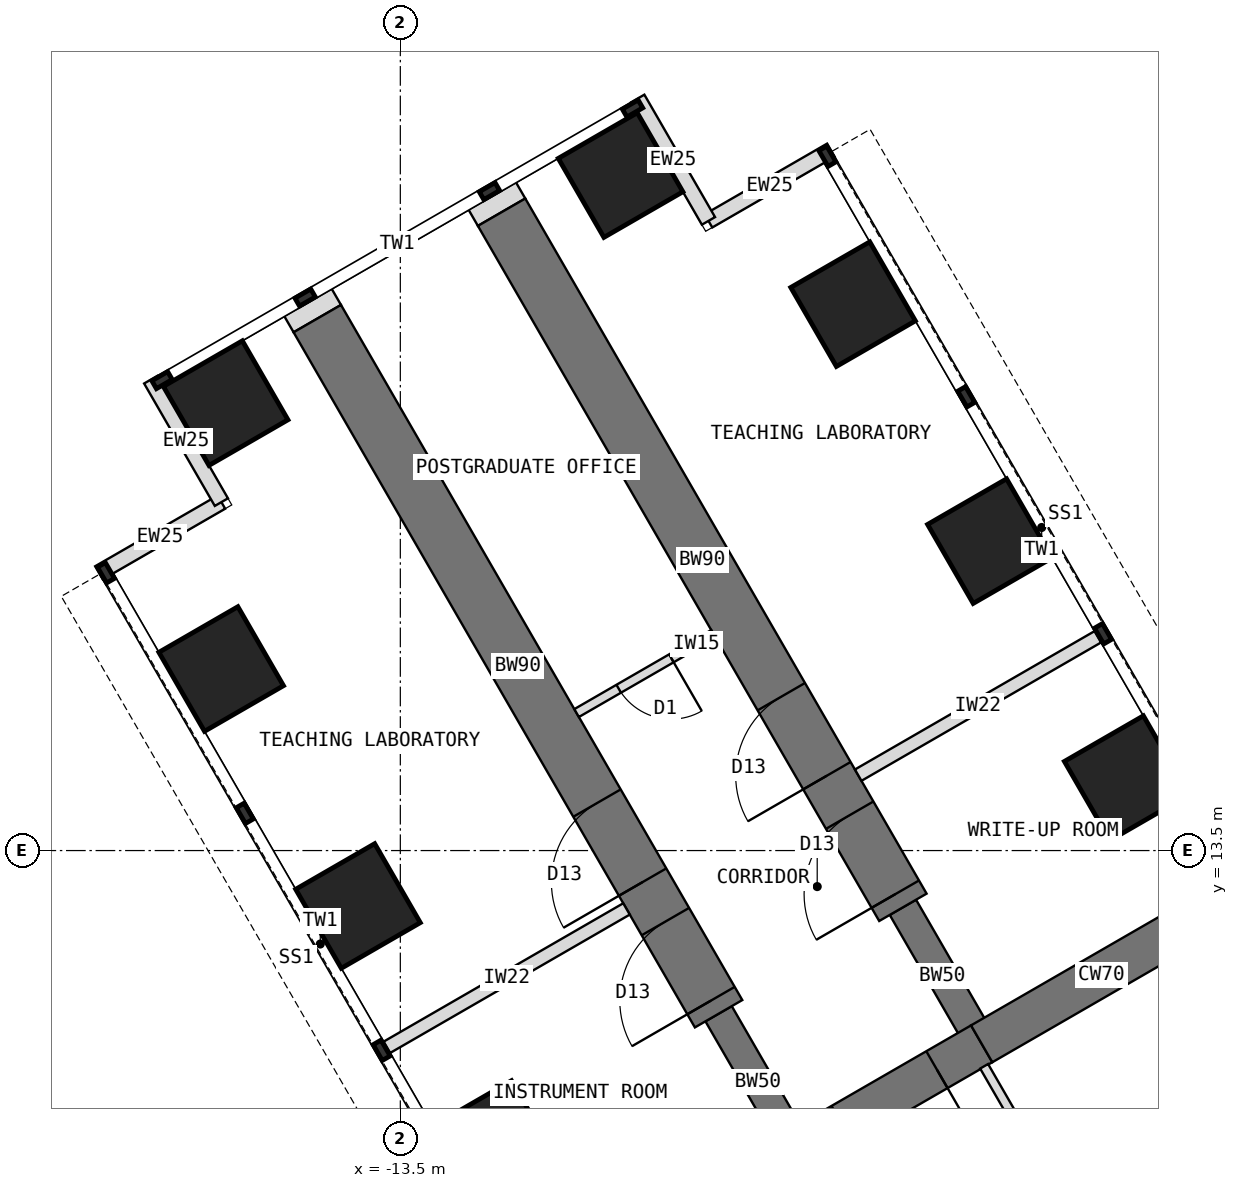
"""IFC4 building model, lengths in metres.
Left out: names, types, materials, properties, quantities, classifications, styles, units other than length and angle.
Written with IfcOpenShell. Run it as: python <this file> out.ifc"""

import sys

from ifc_helpers import new_model, si_unit, direction, frame, frame_2d, origin, origin_2d, place, context, subcontext, project, spatial, rectangle, extrude, element, fill, save


model = new_model("IFC4")
c1 = context("Model", 3, precision=1e-05, world=origin(), true_north=direction((0.0, 1.0)))
c2 = subcontext(c1, "Body", "Model", "MODEL_VIEW")
j1 = project(units=[si_unit("LENGTHUNIT", "METRE"), si_unit("PLANEANGLEUNIT", "RADIAN")], contexts=[c1])
p1 = place(None, origin())
s1 = spatial("IfcSite", under=j1, at=p1, CompositionType="ELEMENT")
p2 = place(p1, origin())
s2 = spatial("IfcBuilding", under=s1, at=p2, CompositionType="ELEMENT")
p3 = place(p2, frame((0.0, 0.0, 24.5)))
s3 = spatial("IfcBuildingStorey", under=s2, at=p3, CompositionType="ELEMENT", Elevation=24.5)
p4 = place(p3, frame((0.0, 12.596, 0.0), z_axis=(0.0, 0.0, 1.0), x_axis=(-0.866011268655, -0.500024481964, 0.0)))
e1 = element("IfcWall", 1, at=p4, inside=s3, PredefinedType="SHEAR", context=c2, shape_type="SweptSolid", body=[
    extrude(rectangle(XDim=4.548, YDim=0.7, at=frame_2d((2.274, 0.0))), origin(), (0.0, 0.0, 1.0), 4.0),
])
p5 = place(p3, frame((-3.939, 10.322, 0.0), z_axis=(0.0, 0.0, 1.0), x_axis=(-0.866019471182, -0.500010275428, 0.0)))
e2 = element("IfcWall", 2, at=p5, inside=s3, PredefinedType="SHEAR", context=c2, shape_type="SweptSolid", body=[
    extrude(rectangle(XDim=3.5, YDim=0.7, at=frame_2d((1.75, 0.0))), origin(), (0.0, 0.0, 1.0), 4.0),
])
p6 = place(p5, frame((0.85, 0.0, 0.0)))
e3 = element("IfcOpeningElement", 3, at=p6, cuts=e2, PredefinedType="OPENING", context=c2, shape_type="SweptSolid", body=[
    extrude(rectangle(XDim=1.8, YDim=2.1, at=frame_2d((0.9, 1.05))), frame((0.0, 0.36, 0.0), z_axis=(0.0, -1.0, 0.0), x_axis=(1.0, 0.0, 0.0)), (0.0, 0.0, 1.0), 0.72),
])
p7 = place(p3, frame((-6.97, 8.572, 0.0), z_axis=(0.0, 0.0, 1.0), x_axis=(-0.499988811324, 0.866031863473, 0.0)))
e4 = element("IfcWall", 4, at=p7, inside=s3, PredefinedType="SHEAR", context=c2, shape_type="SweptSolid", body=[
    extrude(rectangle(XDim=2.592, YDim=0.5, at=frame_2d((1.296, 0.0))), origin(), (0.0, 0.0, 1.0), 4.0),
])
p8 = place(p3, frame((-8.266, 10.816, 0.0), z_axis=(0.0, 0.0, 1.0), x_axis=(-0.499996231654, 0.866027579429, 0.0)))
e5 = element("IfcWall", 5, at=p8, inside=s3, PredefinedType="SHEAR", context=c2, shape_type="SweptSolid", body=[
    extrude(rectangle(XDim=13.2, YDim=0.9, at=frame_2d((6.6, 0.0))), origin(), (0.0, 0.0, 1.0), 4.0),
])
p9 = place(p8, frame((0.25, 0.0, 0.0)))
e6 = element("IfcOpeningElement", 6, at=p9, cuts=e5, PredefinedType="OPENING", context=c2, shape_type="SweptSolid", body=[
    extrude(rectangle(XDim=1.5, YDim=2.1, at=frame_2d((0.75, 1.05))), frame((0.0, 0.46, 0.0), z_axis=(0.0, -1.0, 0.0), x_axis=(1.0, 0.0, 0.0)), (0.0, 0.0, 1.0), 0.92),
])
p10 = place(p8, frame((2.5, 0.0, 0.0)))
e7 = element("IfcOpeningElement", 7, at=p10, cuts=e5, PredefinedType="OPENING", context=c2, shape_type="SweptSolid", body=[
    extrude(rectangle(XDim=1.5, YDim=2.1, at=frame_2d((0.75, 1.05))), frame((0.0, 0.46, 0.0), z_axis=(0.0, -1.0, 0.0), x_axis=(1.0, 0.0, 0.0)), (0.0, 0.0, 1.0), 0.92),
])
p11 = place(p3, frame((-3.939, 10.322, 0.0), z_axis=(0.0, 0.0, 1.0), x_axis=(-0.499918158782, 0.866072649678, 0.0)))
e8 = element("IfcWall", 8, at=p11, inside=s3, PredefinedType="SHEAR", context=c2, shape_type="SweptSolid", body=[
    extrude(rectangle(XDim=2.592, YDim=0.5, at=frame_2d((1.296, 0.0))), origin(), (0.0, 0.0, 1.0), 4.0),
])
p12 = place(p3, frame((-5.234, 12.566, 0.0), z_axis=(0.0, 0.0, 1.0), x_axis=(-0.500010103361, 0.866019570528, 0.0)))
e9 = element("IfcWall", 9, at=p12, inside=s3, PredefinedType="SHEAR", context=c2, shape_type="SweptSolid", body=[
    extrude(rectangle(XDim=13.2, YDim=0.9, at=frame_2d((6.6, 0.0))), origin(), (0.0, 0.0, 1.0), 4.0),
])
p13 = place(p12, frame((0.25, 0.0, 0.0)))
e10 = element("IfcOpeningElement", 10, at=p13, cuts=e9, PredefinedType="OPENING", context=c2, shape_type="SweptSolid", body=[
    extrude(rectangle(XDim=1.5, YDim=2.1, at=frame_2d((0.75, 1.05))), frame((0.0, 0.46, 0.0), z_axis=(0.0, -1.0, 0.0), x_axis=(1.0, 0.0, 0.0)), (0.0, 0.0, 1.0), 0.92),
])
p14 = place(p12, frame((2.5, 0.0, 0.0)))
e11 = element("IfcOpeningElement", 11, at=p14, cuts=e9, PredefinedType="OPENING", context=c2, shape_type="SweptSolid", body=[
    extrude(rectangle(XDim=1.5, YDim=2.1, at=frame_2d((0.75, 1.05))), frame((0.0, 0.46, 0.0), z_axis=(0.0, -1.0, 0.0), x_axis=(1.0, 0.0, 0.0)), (0.0, 0.0, 1.0), 0.92),
])
for number, where, z_axis, x_axis in (
    (12, (-11.946, 8.691, 0.0), (0.0, 0.0, 1.0), (0.866, 0.5, 0.0)),
    (13, (-1.554, 14.691, 0.0), (0.0, 0.0, 1.0), (0.866, 0.5, 0.0)),
    (14, (-14.196, 12.588, 0.0), (0.0, 0.0, 1.0), (0.866, 0.5, 0.0)),
    (15, (-3.804, 18.588, 0.0), (0.0, 0.0, 1.0), (0.866, 0.5, 0.0)),
    (16, (-16.446, 16.486, 0.0), (0.0, 0.0, 1.0), (0.866, 0.5, 0.0)),
    (17, (-6.054, 22.486, 0.0), (0.0, 0.0, 1.0), (0.866, 0.5, 0.0)),
    (18, (-16.373, 20.858, 0.0), (0.0, 0.0, 1.0), (0.866, 0.5, 0.0)),
    (19, (-9.877, 24.608, 0.0), (0.0, 0.0, 1.0), (0.866, 0.5, 0.0)),
):
    element("IfcColumn", number, at=place(p3, frame(where, z_axis=z_axis, x_axis=x_axis)), inside=s3, PredefinedType="COLUMN", context=c2, shape_type="SweptSolid", body=[
        extrude(rectangle(XDim=1.5, YDim=1.5, at=origin_2d()), origin(), (0.0, 0.0, 1.0), 4.0),
    ])
for number, where, z_axis, x_axis in (
    (20, (-18.456, 18.067, 0.0), (0.0, 0.0, 1.0), (0.866, 0.5, 0.0)),
    (21, (-16.443, 19.23, 0.0), (0.0, 0.0, 1.0), (-0.5, 0.866, 0.0)),
    (22, (-6.419, 25.017, 0.0), (0.0, 0.0, 1.0), (-0.866, -0.5, 0.0)),
    (23, (-8.432, 23.855, 0.0), (0.0, 0.0, 1.0), (-0.5, 0.866, 0.0)),
):
    element("IfcWall", number, at=place(p3, frame(where, z_axis=z_axis, x_axis=x_axis)), inside=s3, PredefinedType="STANDARD", context=c2, shape_type="SweptSolid", body=[
        extrude(rectangle(XDim=2.325, YDim=0.25, at=frame_2d((1.163, 0.0))), origin(), (0.0, 0.0, 1.0), 3.8),
    ])
for number, where, z_axis, x_axis in (
    (24, (-14.865, 22.248, 0.0), (0.0, 0.0, 1.0), (-0.5, 0.866, 0.0)),
    (25, (-11.834, 23.998, 0.0), (0.0, 0.0, 1.0), (-0.5, 0.866, 0.0)),
):
    element("IfcWall", number, at=place(p3, frame(where, z_axis=z_axis, x_axis=x_axis)), inside=s3, PredefinedType="PARTITIONING", context=c2, shape_type="SweptSolid", body=[
        extrude(rectangle(XDim=0.31, YDim=0.9, at=frame_2d((0.155, 0.0))), origin(), (0.0, 0.0, 1.0), 3.8),
    ])
p15 = place(p3, frame((-1.201, 6.12, 0.0), z_axis=(0.0, 0.0, 1.0), x_axis=(0.500002627198, 0.866023886965, 0.0)))
e26 = element("IfcWall", 26, at=p15, inside=s3, PredefinedType="SHEAR", context=c2, shape_type="SweptSolid", body=[
    extrude(rectangle(XDim=5.858, YDim=0.4, at=frame_2d((2.929, 0.0))), origin(), (0.0, 0.0, 1.0), 4.0),
])
for number, where, z_axis, x_axis in (
    (27, (-9.78, 12.54, 0.0), (0.0, 0.0, 1.0), (-0.866, -0.5, 0.0)),
    (28, (-5.97, 14.74, 0.0), (0.0, 0.0, 1.0), (0.866, 0.5, 0.0)),
):
    element("IfcWall", number, at=place(p3, frame(where, z_axis=z_axis, x_axis=x_axis)), inside=s3, PredefinedType="PARTITIONING", context=c2, shape_type="SweptSolid", body=[
        extrude(rectangle(XDim=4.55, YDim=0.215, at=frame_2d((2.275, 0.0))), origin(), (0.0, 0.0, 1.0), 3.8),
    ])
p16 = place(p3, frame((-3.898, 9.952, 0.0), z_axis=(0.0, 0.0, 1.0), x_axis=(0.499999927604, -0.866025445582, 0.0)))
e29 = element("IfcWall", 29, at=p16, inside=s3, PredefinedType="PARTITIONING", context=c2, shape_type="SweptSolid", body=[
    extrude(rectangle(XDim=4.468, YDim=0.15, at=frame_2d((2.234, 0.0))), origin(), (0.0, 0.0, 1.0), 3.8),
])
p17 = place(p16, frame((1.724, 0.0, 0.0)))
e30 = element("IfcOpeningElement", 30, at=p17, cuts=e29, PredefinedType="OPENING", context=c2, shape_type="SweptSolid", body=[
    extrude(rectangle(XDim=1.0, YDim=2.1, at=frame_2d((0.5, 1.05))), frame((0.0, 0.085, 0.0), z_axis=(0.0, -1.0, 0.0), x_axis=(1.0, 0.0, 0.0)), (0.0, 0.0, 1.0), 0.17),
])
p18 = place(p3, frame((-8.349, 17.061, 0.0), z_axis=(0.0, 0.0, 1.0), x_axis=(-0.866021400173, -0.500006934395, 0.0)))
e31 = element("IfcWall", 31, at=p18, inside=s3, PredefinedType="PARTITIONING", context=c2, shape_type="SweptSolid", body=[
    extrude(rectangle(XDim=2.6, YDim=0.15, at=frame_2d((1.3, 0.0))), origin(), (0.0, 0.0, 1.0), 3.8),
])
p19 = place(p18, frame((0.8, 0.0, 0.0)))
e32 = element("IfcOpeningElement", 32, at=p19, cuts=e31, PredefinedType="OPENING", context=c2, shape_type="SweptSolid", body=[
    extrude(rectangle(XDim=1.0, YDim=2.1, at=frame_2d((0.5, 1.05))), frame((0.0, 0.085, 0.0), z_axis=(0.0, -1.0, 0.0), x_axis=(1.0, 0.0, 0.0)), (0.0, 0.0, 1.0), 0.17),
])
p20 = place(p6, origin())
e33 = element("IfcDoor", 33, at=p20, inside=s3, OperationType="DOUBLE_DOOR_DOUBLE_SWING", PredefinedType="DOOR", context=c2, shape_type="SweptSolid", body=[
    extrude(rectangle(XDim=1.72, YDim=2.06, at=frame_2d((0.9, 1.03))), frame((0.0, 0.025, 0.0), z_axis=(0.0, -1.0, 0.0), x_axis=(1.0, 0.0, 0.0)), (0.0, 0.0, 1.0), 0.05),
    extrude(rectangle(XDim=0.04, YDim=2.1, at=frame_2d((0.02, 1.05))), frame((0.0, 0.35, 0.0), z_axis=(0.0, -1.0, 0.0), x_axis=(1.0, 0.0, 0.0)), (0.0, 0.0, 1.0), 0.699),
    extrude(rectangle(XDim=0.04, YDim=2.1, at=frame_2d((1.78, 1.05))), frame((0.0, 0.35, 0.0), z_axis=(0.0, -1.0, 0.0), x_axis=(1.0, 0.0, 0.0)), (0.0, 0.0, 1.0), 0.699),
    extrude(rectangle(XDim=1.72, YDim=0.04, at=frame_2d((0.9, 2.08))), frame((0.0, 0.35, 0.0), z_axis=(0.0, -1.0, 0.0), x_axis=(1.0, 0.0, 0.0)), (0.0, 0.0, 1.0), 0.699),
])
fill(e3, e33)
p21 = place(p19, origin())
e34 = element("IfcDoor", 34, at=p21, inside=s3, OperationType="SINGLE_SWING_LEFT", PredefinedType="DOOR", context=c2, shape_type="SweptSolid", body=[
    extrude(rectangle(XDim=1.0, YDim=2.1, at=frame_2d((0.5, 1.05))), frame((0.0, 0.025, 0.0), z_axis=(0.0, -1.0, 0.0), x_axis=(1.0, 0.0, 0.0)), (0.0, 0.0, 1.0), 0.05),
])
fill(e32, e34)
p22 = place(p9, origin())
e35 = element("IfcDoor", 35, at=p22, inside=s3, OperationType="DOUBLE_DOOR_SINGLE_SWING", PredefinedType="DOOR", context=c2, shape_type="SweptSolid", body=[
    extrude(rectangle(XDim=1.42, YDim=2.06, at=frame_2d((0.75, 1.03))), frame((0.0, 0.025, 0.0), z_axis=(0.0, -1.0, 0.0), x_axis=(1.0, 0.0, 0.0)), (0.0, 0.0, 1.0), 0.05),
    extrude(rectangle(XDim=0.04, YDim=2.1, at=frame_2d((0.02, 1.05))), frame((0.0, 0.45, 0.0), z_axis=(0.0, -1.0, 0.0), x_axis=(1.0, 0.0, 0.0)), (0.0, 0.0, 1.0), 0.899),
    extrude(rectangle(XDim=0.04, YDim=2.1, at=frame_2d((1.48, 1.05))), frame((0.0, 0.45, 0.0), z_axis=(0.0, -1.0, 0.0), x_axis=(1.0, 0.0, 0.0)), (0.0, 0.0, 1.0), 0.899),
    extrude(rectangle(XDim=1.42, YDim=0.04, at=frame_2d((0.75, 2.08))), frame((0.0, 0.45, 0.0), z_axis=(0.0, -1.0, 0.0), x_axis=(1.0, 0.0, 0.0)), (0.0, 0.0, 1.0), 0.899),
])
fill(e6, e35)
p23 = place(p10, origin())
e36 = element("IfcDoor", 36, at=p23, inside=s3, OperationType="DOUBLE_DOOR_SINGLE_SWING", PredefinedType="DOOR", context=c2, shape_type="SweptSolid", body=[
    extrude(rectangle(XDim=1.42, YDim=2.06, at=frame_2d((0.75, 1.03))), frame((0.0, 0.025, 0.0), z_axis=(0.0, -1.0, 0.0), x_axis=(1.0, 0.0, 0.0)), (0.0, 0.0, 1.0), 0.05),
    extrude(rectangle(XDim=0.04, YDim=2.1, at=frame_2d((0.02, 1.05))), frame((0.0, 0.45, 0.0), z_axis=(0.0, -1.0, 0.0), x_axis=(1.0, 0.0, 0.0)), (0.0, 0.0, 1.0), 0.899),
    extrude(rectangle(XDim=0.04, YDim=2.1, at=frame_2d((1.48, 1.05))), frame((0.0, 0.45, 0.0), z_axis=(0.0, -1.0, 0.0), x_axis=(1.0, 0.0, 0.0)), (0.0, 0.0, 1.0), 0.899),
    extrude(rectangle(XDim=1.42, YDim=0.04, at=frame_2d((0.75, 2.08))), frame((0.0, 0.45, 0.0), z_axis=(0.0, -1.0, 0.0), x_axis=(1.0, 0.0, 0.0)), (0.0, 0.0, 1.0), 0.899),
])
fill(e7, e36)
p24 = place(p13, origin())
e37 = element("IfcDoor", 37, at=p24, inside=s3, OperationType="DOUBLE_DOOR_SINGLE_SWING", PredefinedType="DOOR", context=c2, shape_type="SweptSolid", body=[
    extrude(rectangle(XDim=1.42, YDim=2.06, at=frame_2d((0.75, 1.03))), frame((0.0, 0.025, 0.0), z_axis=(0.0, -1.0, 0.0), x_axis=(1.0, 0.0, 0.0)), (0.0, 0.0, 1.0), 0.05),
    extrude(rectangle(XDim=0.04, YDim=2.1, at=frame_2d((0.02, 1.05))), frame((0.0, 0.45, 0.0), z_axis=(0.0, -1.0, 0.0), x_axis=(1.0, 0.0, 0.0)), (0.0, 0.0, 1.0), 0.899),
    extrude(rectangle(XDim=0.04, YDim=2.1, at=frame_2d((1.48, 1.05))), frame((0.0, 0.45, 0.0), z_axis=(0.0, -1.0, 0.0), x_axis=(1.0, 0.0, 0.0)), (0.0, 0.0, 1.0), 0.899),
    extrude(rectangle(XDim=1.42, YDim=0.04, at=frame_2d((0.75, 2.08))), frame((0.0, 0.45, 0.0), z_axis=(0.0, -1.0, 0.0), x_axis=(1.0, 0.0, 0.0)), (0.0, 0.0, 1.0), 0.899),
])
fill(e10, e37)
p25 = place(p14, origin())
e38 = element("IfcDoor", 38, at=p25, inside=s3, OperationType="DOUBLE_DOOR_SINGLE_SWING", PredefinedType="DOOR", context=c2, shape_type="SweptSolid", body=[
    extrude(rectangle(XDim=1.42, YDim=2.06, at=frame_2d((0.75, 1.03))), frame((0.0, 0.025, 0.0), z_axis=(0.0, -1.0, 0.0), x_axis=(1.0, 0.0, 0.0)), (0.0, 0.0, 1.0), 0.05),
    extrude(rectangle(XDim=0.04, YDim=2.1, at=frame_2d((0.02, 1.05))), frame((0.0, 0.45, 0.0), z_axis=(0.0, -1.0, 0.0), x_axis=(1.0, 0.0, 0.0)), (0.0, 0.0, 1.0), 0.899),
    extrude(rectangle(XDim=0.04, YDim=2.1, at=frame_2d((1.48, 1.05))), frame((0.0, 0.45, 0.0), z_axis=(0.0, -1.0, 0.0), x_axis=(1.0, 0.0, 0.0)), (0.0, 0.0, 1.0), 0.899),
    extrude(rectangle(XDim=1.42, YDim=0.04, at=frame_2d((0.75, 2.08))), frame((0.0, 0.45, 0.0), z_axis=(0.0, -1.0, 0.0), x_axis=(1.0, 0.0, 0.0)), (0.0, 0.0, 1.0), 0.899),
])
fill(e11, e38)
save(model, sys.argv[1])
